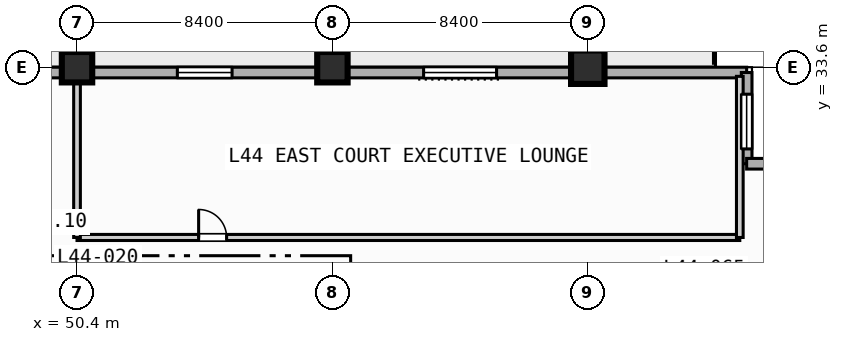
"""IFC4 building model, lengths in metres.
Left out: names, types, materials, properties, quantities, classifications, styles, units other than length and angle.
Written with IfcOpenShell. Run it as: python <this file> out.ifc"""

import sys

from ifc_helpers import new_model, si_unit, direction, frame, frame_2d, origin, origin_2d, place, context, subcontext, project, spatial, rectangle, extrude, element, fill, save


model = new_model("IFC4")
c1 = context("Model", 3, precision=1e-05, world=origin(), true_north=direction((0.0, 1.0)))
c2 = subcontext(c1, "Body", "Model", "MODEL_VIEW")
j1 = project(units=[si_unit("LENGTHUNIT", "METRE"), si_unit("PLANEANGLEUNIT", "RADIAN")], contexts=[c1])
p1 = place(None, origin())
s1 = spatial("IfcSite", under=j1, at=p1, CompositionType="ELEMENT")
p2 = place(p1, origin())
s2 = spatial("IfcBuilding", under=s1, at=p2, CompositionType="ELEMENT")
p3 = place(p2, frame((0.0, 0.0, 182.8)))
s3 = spatial("IfcBuildingStorey", under=s2, at=p3, CompositionType="ELEMENT", Elevation=182.8)
for number, where, z_axis, x_axis in (
    (1, (50.4, 33.6, 0.0), (0.0, 0.0, 1.0), (1.0, 0.0, 0.0)),
    (2, (58.8, 33.6, 0.0), (0.0, 0.0, 1.0), (1.0, 0.0, 0.0)),
):
    element("IfcColumn", number, at=place(p3, frame(where, z_axis=z_axis, x_axis=x_axis)), inside=s3, PredefinedType="COLUMN", context=c2, shape_type="SweptSolid", body=[
        extrude(rectangle(XDim=1.0, YDim=1.0, at=origin_2d()), origin(), (0.0, 0.0, 1.0), 3.7),
    ])
p4 = place(p3, frame((67.2, 33.6, 0.0), z_axis=(0.0, 0.0, 1.0), x_axis=(1.0, 0.0, 0.0)))
e3 = element("IfcColumn", 3, at=p4, inside=s3, PredefinedType="COLUMN", context=c2, shape_type="SweptSolid", body=[
    extrude(rectangle(XDim=1.1, YDim=1.1, at=origin_2d()), origin(), (0.0, 0.0, 1.0), 3.7),
])
p5 = place(p3, frame((33.425, 33.425, 0.0), z_axis=(0.0, 0.0, 1.0), x_axis=(1.0, 0.0, 0.0)))
e4 = element("IfcWall", 4, at=p5, inside=s3, PredefinedType="STANDARD", context=c2, shape_type="SweptSolid", body=[
    extrude(rectangle(XDim=39.0, YDim=0.35, at=frame_2d((19.5, 0.0))), origin(), (0.0, 0.0, 1.0), 3.47),
])
p6 = place(p5, frame((12.075, 0.0, 0.0)))
e5 = element("IfcOpeningElement", 5, at=p6, cuts=e4, PredefinedType="OPENING", context=c2, shape_type="SweptSolid", body=[
    extrude(rectangle(XDim=1.4, YDim=2.2, at=frame_2d((0.7, 1.1))), frame((0.0, 0.185, 0.0), z_axis=(0.0, -1.0, 0.0), x_axis=(1.0, 0.0, 0.0)), (0.0, 0.0, 1.0), 0.37),
])
p7 = place(p5, frame((20.275, 0.0, 0.85)))
e6 = element("IfcOpeningElement", 6, at=p7, cuts=e4, PredefinedType="OPENING", context=c2, shape_type="SweptSolid", body=[
    extrude(rectangle(XDim=1.8, YDim=1.8, at=frame_2d((0.9, 0.9))), frame((0.0, 0.185, 0.0), z_axis=(0.0, -1.0, 0.0), x_axis=(1.0, 0.0, 0.0)), (0.0, 0.0, 1.0), 0.37),
])
p8 = place(p5, frame((28.375, 0.0, 0.85)))
e7 = element("IfcOpeningElement", 7, at=p8, cuts=e4, PredefinedType="OPENING", context=c2, shape_type="SweptSolid", body=[
    extrude(rectangle(XDim=2.4, YDim=1.95, at=frame_2d((1.2, 0.975))), frame((0.0, 0.185, 0.0), z_axis=(0.0, -1.0, 0.0), x_axis=(1.0, 0.0, 0.0)), (0.0, 0.0, 1.0), 0.37),
])
p9 = place(p3, frame((72.425, 33.425, 0.0), z_axis=(0.0, 0.0, 1.0), x_axis=(0.0, -1.0, 0.0)))
e8 = element("IfcWall", 8, at=p9, inside=s3, PredefinedType="STANDARD", context=c2, shape_type="SweptSolid", body=[
    extrude(rectangle(XDim=3.0, YDim=0.35, at=frame_2d((1.5, 0.0))), origin(), (0.0, 0.0, 1.0), 3.47),
])
p10 = place(p9, frame((0.712, 0.0, 0.85)))
e9 = element("IfcOpeningElement", 9, at=p10, cuts=e8, PredefinedType="OPENING", context=c2, shape_type="SweptSolid", body=[
    extrude(rectangle(XDim=1.8, YDim=1.8, at=frame_2d((0.9, 0.9))), frame((0.0, 0.185, 0.0), z_axis=(0.0, -1.0, 0.0), x_axis=(1.0, 0.0, 0.0)), (0.0, 0.0, 1.0), 0.37),
])
p11 = place(p3, frame((72.425, 30.425, 0.0), z_axis=(0.0, 0.0, 1.0), x_axis=(1.0, 0.0, 0.0)))
e10 = element("IfcWall", 10, at=p11, inside=s3, PredefinedType="STANDARD", context=c2, shape_type="SweptSolid", body=[
    extrude(rectangle(XDim=3.0, YDim=0.35, at=frame_2d((1.5, 0.0))), origin(), (0.0, 0.0, 1.0), 3.47),
])
p12 = place(p3, frame((50.4, 28.0, 0.0), z_axis=(0.0, 0.0, 1.0), x_axis=(1.0, 0.0, 0.0)))
e11 = element("IfcWall", 11, at=p12, inside=s3, PredefinedType="PARTITIONING", context=c2, shape_type="SweptSolid", body=[
    extrude(rectangle(XDim=21.8, YDim=0.2, at=frame_2d((10.9, 0.0))), origin(), (0.0, 0.0, 1.0), 3.47),
])
p13 = place(p12, frame((4.0, 0.0, 0.0)))
e12 = element("IfcOpeningElement", 12, at=p13, cuts=e11, PredefinedType="OPENING", context=c2, shape_type="SweptSolid", body=[
    extrude(rectangle(XDim=0.92, YDim=2.1, at=frame_2d((0.46, 1.05))), frame((0.0, 0.11, 0.0), z_axis=(0.0, -1.0, 0.0), x_axis=(1.0, 0.0, 0.0)), (0.0, 0.0, 1.0), 0.22),
])
p14 = place(p3, frame((50.4, 28.0, 0.0), z_axis=(0.0, 0.0, 1.0), x_axis=(0.0, 1.0, 0.0)))
e13 = element("IfcWall", 13, at=p14, inside=s3, PredefinedType="PARTITIONING", context=c2, shape_type="SweptSolid", body=[
    extrude(rectangle(XDim=5.3, YDim=0.22, at=frame_2d((2.65, 0.0))), origin(), (0.0, 0.0, 1.0), 2.82),
])
p15 = place(p3, frame((72.2, 28.0, 0.0), z_axis=(0.0, 0.0, 1.0), x_axis=(0.0, 1.0, 0.0)))
e14 = element("IfcWall", 14, at=p15, inside=s3, PredefinedType="PARTITIONING", context=c2, shape_type="SweptSolid", body=[
    extrude(rectangle(XDim=5.3, YDim=0.22, at=frame_2d((2.65, 0.0))), origin(), (0.0, 0.0, 1.0), 3.47),
])
p16 = place(p7, origin())
e15 = element("IfcWindow", 15, at=p16, inside=s3, PartitioningType="SINGLE_PANEL", PredefinedType="WINDOW", context=c2, shape_type="SweptSolid", body=[
    extrude(rectangle(XDim=1.8, YDim=1.8, at=frame_2d((0.9, 0.9))), frame((0.0, 0.03, 0.0), z_axis=(0.0, -1.0, 0.0), x_axis=(1.0, 0.0, 0.0)), (0.0, 0.0, 1.0), 0.06),
])
fill(e6, e15)
p17 = place(p8, origin())
e16 = element("IfcWindow", 16, at=p17, inside=s3, PartitioningType="SINGLE_PANEL", PredefinedType="WINDOW", context=c2, shape_type="SweptSolid", body=[
    extrude(rectangle(XDim=2.4, YDim=1.95, at=frame_2d((1.2, 0.975))), frame((0.0, 0.03, 0.0), z_axis=(0.0, -1.0, 0.0), x_axis=(1.0, 0.0, 0.0)), (0.0, 0.0, 1.0), 0.06),
])
fill(e7, e16)
p18 = place(p10, origin())
e17 = element("IfcWindow", 17, at=p18, inside=s3, PartitioningType="SINGLE_PANEL", PredefinedType="WINDOW", context=c2, shape_type="SweptSolid", body=[
    extrude(rectangle(XDim=1.8, YDim=1.8, at=frame_2d((0.9, 0.9))), frame((0.0, 0.03, 0.0), z_axis=(0.0, -1.0, 0.0), x_axis=(1.0, 0.0, 0.0)), (0.0, 0.0, 1.0), 0.06),
])
fill(e9, e17)
p19 = place(p13, origin())
e18 = element("IfcDoor", 18, at=p19, inside=s3, OperationType="SINGLE_SWING_LEFT", PredefinedType="DOOR", context=c2, shape_type="SweptSolid", body=[
    extrude(rectangle(XDim=0.92, YDim=2.1, at=frame_2d((0.46, 1.05))), frame((0.0, 0.025, 0.0), z_axis=(0.0, -1.0, 0.0), x_axis=(1.0, 0.0, 0.0)), (0.0, 0.0, 1.0), 0.05),
])
fill(e12, e18)
save(model, sys.argv[1])
